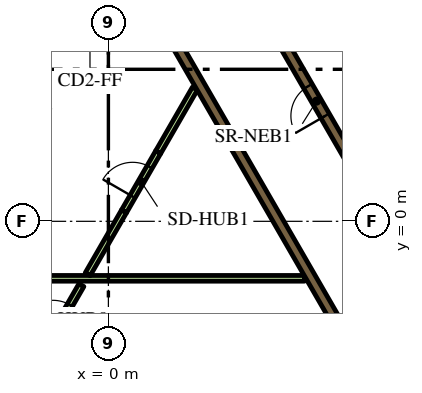
"""IFC4 building model, lengths in metres.
Left out: names, types, materials, properties, quantities, classifications, styles, units other than length and angle.
Written with IfcOpenShell. Run it as: python <this file> out.ifc"""

import sys

from ifc_helpers import new_model, si_unit, direction, frame, frame_2d, origin, place, context, subcontext, project, spatial, polyline, rectangle, outline, extrude, element, fill, save


model = new_model("IFC4")
c1 = context("Model", 3, precision=1e-05, world=origin(), true_north=direction((0.0, 1.0)))
c2 = subcontext(c1, "Body", "Model", "MODEL_VIEW")
j1 = project(units=[si_unit("LENGTHUNIT", "METRE"), si_unit("PLANEANGLEUNIT", "RADIAN")], contexts=[c1])
p1 = place(None, origin())
s1 = spatial("IfcSite", under=j1, at=p1, CompositionType="ELEMENT")
p2 = place(p1, origin())
s2 = spatial("IfcBuilding", under=s1, at=p2, CompositionType="ELEMENT")
p3 = place(p2, frame((0.0, 0.0, 27.6)))
s3 = spatial("IfcBuildingStorey", under=s2, at=p3, CompositionType="ELEMENT", Elevation=27.6)
p4 = place(p3, origin())
e1 = element("IfcWall", 1, at=p4, inside=s3, PredefinedType="SOLIDWALL", context=c2, shape_type="SweptSolid", body=[
    extrude(outline(polyline([(0.566, 6.725), (0.566, 6.875), (0.566, 6.875), (0.565, 6.875), (0.361, 6.875), (0.035, 7.439), (0.252, 7.564), (0.377, 7.348), (6.552, -3.348), (6.677, -3.564), (6.46, -3.689), (0.448, 6.725), (0.565, 6.725), (0.566, 6.725), (0.566, 6.725)])), origin(), (0.0, 0.0, 1.0), 3.9),
])
p5 = place(p3, frame((-4.2, -1.5, 0.0), z_axis=(0.0, 0.0, 1.0), x_axis=(1.0, 0.0, 0.0)))
e2 = element("IfcWall", 2, at=p5, inside=s3, PredefinedType="PARTITIONING", context=c2, shape_type="SweptSolid", body=[
    extrude(rectangle(XDim=9.359, YDim=0.15, at=frame_2d((4.68, 0.0))), origin(), (0.0, 0.0, 1.0), 2.75),
])
p6 = place(p3, frame((-0.544, -1.393, 0.0), z_axis=(0.0, 0.0, 1.0), x_axis=(0.499928740635, 0.866066541489, 0.0)))
e3 = element("IfcWall", 3, at=p6, inside=s3, PredefinedType="PARTITIONING", context=c2, shape_type="SweptSolid", body=[
    extrude(rectangle(XDim=1.912, YDim=0.15, at=frame_2d((0.956, 0.0))), origin(), (0.0, 0.0, 1.0), 2.75),
])
p7 = place(p3, frame((1.312, 1.822, 0.0), z_axis=(0.0, 0.0, 1.0), x_axis=(0.500003549559, 0.866023354436, 0.0)))
e4 = element("IfcWall", 4, at=p7, inside=s3, PredefinedType="PARTITIONING", context=c2, shape_type="SweptSolid", body=[
    extrude(rectangle(XDim=1.93, YDim=0.15, at=frame_2d((0.965, 0.0))), origin(), (0.0, 0.0, 1.0), 2.75),
])
p8 = place(p3, frame((11.553, -0.46, 0.0), z_axis=(0.0, 0.0, 1.0), x_axis=(-0.500006514828, 0.866021642414, 0.0)))
e5 = element("IfcWall", 5, at=p8, inside=s3, PredefinedType="SOLIDWALL", context=c2, shape_type="SweptSolid", body=[
    extrude(rectangle(XDim=12.35, YDim=0.25, at=frame_2d((6.175, 0.0))), origin(), (0.0, 0.0, 1.0), 3.9),
])
p9 = place(p8, frame((0.585, 0.0, 0.0)))
e6 = element("IfcOpeningElement", 6, at=p9, cuts=e5, PredefinedType="OPENING", context=c2, shape_type="SweptSolid", body=[
    extrude(rectangle(XDim=1.1, YDim=2.1, at=frame_2d((0.55, 1.05))), frame((0.0, 0.135, 0.0), z_axis=(0.0, -1.0, 0.0), x_axis=(1.0, 0.0, 0.0)), (0.0, 0.0, 1.0), 0.27),
])
p10 = place(p8, frame((3.105, 0.0, 0.0)))
e7 = element("IfcOpeningElement", 7, at=p10, cuts=e5, PredefinedType="OPENING", context=c2, shape_type="SweptSolid", body=[
    extrude(rectangle(XDim=1.1, YDim=2.1, at=frame_2d((0.55, 1.05))), frame((0.0, 0.135, 0.0), z_axis=(0.0, -1.0, 0.0), x_axis=(1.0, 0.0, 0.0)), (0.0, 0.0, 1.0), 0.27),
])
p11 = place(p8, frame((5.625, 0.0, 0.0)))
e8 = element("IfcOpeningElement", 8, at=p11, cuts=e5, PredefinedType="OPENING", context=c2, shape_type="SweptSolid", body=[
    extrude(rectangle(XDim=1.1, YDim=2.1, at=frame_2d((0.55, 1.05))), frame((0.0, 0.135, 0.0), z_axis=(0.0, -1.0, 0.0), x_axis=(1.0, 0.0, 0.0)), (0.0, 0.0, 1.0), 0.27),
])
p12 = place(p3, frame((8.565, -2.185, 0.0), z_axis=(0.0, 0.0, 1.0), x_axis=(-0.499997954832, 0.866026584559, 0.0)))
e9 = element("IfcWall", 9, at=p12, inside=s3, PredefinedType="SOLIDWALL", context=c2, shape_type="SweptSolid", body=[
    extrude(rectangle(XDim=12.35, YDim=0.25, at=frame_2d((6.175, 0.0))), origin(), (0.0, 0.0, 1.0), 3.9),
])
p13 = place(p12, frame((5.725, 0.0, 0.0)))
e10 = element("IfcOpeningElement", 10, at=p13, cuts=e9, PredefinedType="OPENING", context=c2, shape_type="SweptSolid", body=[
    extrude(rectangle(XDim=0.9, YDim=2.1, at=frame_2d((0.45, 1.05))), frame((0.0, 0.135, 0.0), z_axis=(0.0, -1.0, 0.0), x_axis=(1.0, 0.0, 0.0)), (0.0, 0.0, 1.0), 0.27),
])
p14 = place(p3, frame((-0.898, 6.194, 0.0), z_axis=(0.0, 0.0, 1.0), x_axis=(-0.499996202215, -0.866027596426, 0.0)))
e11 = element("IfcWall", 11, at=p14, inside=s3, PredefinedType="SOLIDWALL", context=c2, shape_type="SweptSolid", body=[
    extrude(rectangle(XDim=9.83, YDim=0.25, at=frame_2d((4.915, 0.0))), origin(), (0.0, 0.0, 1.0), 3.9),
])
p15 = place(p14, frame((0.585, 0.0, 0.0)))
e12 = element("IfcOpeningElement", 12, at=p15, cuts=e11, PredefinedType="OPENING", context=c2, shape_type="SweptSolid", body=[
    extrude(rectangle(XDim=1.1, YDim=2.1, at=frame_2d((0.55, 1.05))), frame((0.0, 0.135, 0.0), z_axis=(0.0, -1.0, 0.0), x_axis=(1.0, 0.0, 0.0)), (0.0, 0.0, 1.0), 0.27),
])
p16 = place(p14, frame((3.105, 0.0, 0.0)))
e13 = element("IfcOpeningElement", 13, at=p16, cuts=e11, PredefinedType="OPENING", context=c2, shape_type="SweptSolid", body=[
    extrude(rectangle(XDim=1.1, YDim=2.1, at=frame_2d((0.55, 1.05))), frame((0.0, 0.135, 0.0), z_axis=(0.0, -1.0, 0.0), x_axis=(1.0, 0.0, 0.0)), (0.0, 0.0, 1.0), 0.27),
])
p17 = place(p14, frame((5.625, 0.0, 0.0)))
e14 = element("IfcOpeningElement", 14, at=p17, cuts=e11, PredefinedType="OPENING", context=c2, shape_type="SweptSolid", body=[
    extrude(rectangle(XDim=1.1, YDim=2.1, at=frame_2d((0.55, 1.05))), frame((0.0, 0.135, 0.0), z_axis=(0.0, -1.0, 0.0), x_axis=(1.0, 0.0, 0.0)), (0.0, 0.0, 1.0), 0.27),
])
p18 = place(p14, frame((8.145, 0.0, 0.0)))
e15 = element("IfcOpeningElement", 15, at=p18, cuts=e11, PredefinedType="OPENING", context=c2, shape_type="SweptSolid", body=[
    extrude(rectangle(XDim=1.1, YDim=2.1, at=frame_2d((0.55, 1.05))), frame((0.0, 0.135, 0.0), z_axis=(0.0, -1.0, 0.0), x_axis=(1.0, 0.0, 0.0)), (0.0, 0.0, 1.0), 0.27),
])
p19 = place(p3, frame((-1.76, -3.498, 0.0), z_axis=(0.0, 0.0, 1.0), x_axis=(0.499977374825, 0.866038466041, 0.0)))
e16 = element("IfcWall", 16, at=p19, inside=s3, PredefinedType="PARTITIONING", context=c2, shape_type="SweptSolid", body=[
    extrude(rectangle(XDim=2.1, YDim=0.15, at=frame_2d((1.05, 0.0))), origin(), (0.0, 0.0, 1.0), 2.75),
])
p20 = place(p19, frame((0.6, 0.0, 0.0)))
e17 = element("IfcOpeningElement", 17, at=p20, cuts=e16, PredefinedType="OPENING", context=c2, shape_type="SweptSolid", body=[
    extrude(rectangle(XDim=0.9, YDim=2.1, at=frame_2d((0.45, 1.05))), frame((0.0, 0.085, 0.0), z_axis=(0.0, -1.0, 0.0), x_axis=(1.0, 0.0, 0.0)), (0.0, 0.0, 1.0), 0.17),
])
p21 = place(p3, frame((0.412, 0.263, 0.0), z_axis=(0.0, 0.0, 1.0), x_axis=(0.500062916607, 0.865989075817, 0.0)))
e18 = element("IfcWall", 18, at=p21, inside=s3, PredefinedType="PARTITIONING", context=c2, shape_type="SweptSolid", body=[
    extrude(rectangle(XDim=1.8, YDim=0.15, at=frame_2d((0.9, 0.0))), origin(), (0.0, 0.0, 1.0), 2.75),
])
p22 = place(p21, frame((0.45, 0.0, 0.0)))
e19 = element("IfcOpeningElement", 19, at=p22, cuts=e18, PredefinedType="OPENING", context=c2, shape_type="SweptSolid", body=[
    extrude(rectangle(XDim=0.9, YDim=2.1, at=frame_2d((0.45, 1.05))), frame((0.0, 0.085, 0.0), z_axis=(0.0, -1.0, 0.0), x_axis=(1.0, 0.0, 0.0)), (0.0, 0.0, 1.0), 0.17),
])
p23 = place(p3, frame((6.163, 18.475, 0.0), z_axis=(0.0, 0.0, 1.0), x_axis=(0.500001317485, -0.866024643133, 0.0)))
e20 = element("IfcWall", 20, at=p23, inside=s3, PredefinedType="PARTITIONING", context=c2, shape_type="SweptSolid", body=[
    extrude(rectangle(XDim=25.767, YDim=0.15, at=frame_2d((12.883, 0.0))), origin(), (0.0, 0.0, 1.0), 2.75),
])
p24 = place(p23, frame((24.586, 0.0, 0.0)))
e21 = element("IfcOpeningElement", 21, at=p24, cuts=e20, PredefinedType="OPENING", context=c2, shape_type="SweptSolid", body=[
    extrude(rectangle(XDim=1.0, YDim=2.1, at=frame_2d((0.5, 1.05))), frame((0.0, 0.085, 0.0), z_axis=(0.0, -1.0, 0.0), x_axis=(1.0, 0.0, 0.0)), (0.0, 0.0, 1.0), 0.17),
])
p25 = place(p23, frame((19.319, 0.0, 0.0)))
e22 = element("IfcOpeningElement", 22, at=p25, cuts=e20, PredefinedType="OPENING", context=c2, shape_type="SweptSolid", body=[
    extrude(rectangle(XDim=1.0, YDim=2.1, at=frame_2d((0.5, 1.05))), frame((0.0, 0.085, 0.0), z_axis=(0.0, -1.0, 0.0), x_axis=(1.0, 0.0, 0.0)), (0.0, 0.0, 1.0), 0.17),
])
p26 = place(p23, frame((18.012, 0.0, 0.0)))
e23 = element("IfcOpeningElement", 23, at=p26, cuts=e20, PredefinedType="OPENING", context=c2, shape_type="SweptSolid", body=[
    extrude(rectangle(XDim=1.0, YDim=2.1, at=frame_2d((0.5, 1.05))), frame((0.0, 0.085, 0.0), z_axis=(0.0, -1.0, 0.0), x_axis=(1.0, 0.0, 0.0)), (0.0, 0.0, 1.0), 0.17),
])
p27 = place(p23, frame((6.824, 0.0, 0.0)))
e24 = element("IfcOpeningElement", 24, at=p27, cuts=e20, PredefinedType="OPENING", context=c2, shape_type="SweptSolid", body=[
    extrude(rectangle(XDim=1.1, YDim=2.1, at=frame_2d((0.55, 1.05))), frame((0.0, 0.085, 0.0), z_axis=(0.0, -1.0, 0.0), x_axis=(1.0, 0.0, 0.0)), (0.0, 0.0, 1.0), 0.17),
])
p28 = place(p23, frame((4.658, 0.0, 0.0)))
e25 = element("IfcOpeningElement", 25, at=p28, cuts=e20, PredefinedType="OPENING", context=c2, shape_type="SweptSolid", body=[
    extrude(rectangle(XDim=0.9, YDim=2.1, at=frame_2d((0.45, 1.05))), frame((0.0, 0.085, 0.0), z_axis=(0.0, -1.0, 0.0), x_axis=(1.0, 0.0, 0.0)), (0.0, 0.0, 1.0), 0.17),
])
p29 = place(p23, frame((0.18, 0.0, 0.0)))
e26 = element("IfcOpeningElement", 26, at=p29, cuts=e20, PredefinedType="OPENING", context=c2, shape_type="SweptSolid", body=[
    extrude(rectangle(XDim=1.0, YDim=2.1, at=frame_2d((0.5, 1.05))), frame((0.0, 0.085, 0.0), z_axis=(0.0, -1.0, 0.0), x_axis=(1.0, 0.0, 0.0)), (0.0, 0.0, 1.0), 0.17),
])
p30 = place(p13, origin())
e27 = element("IfcDoor", 27, at=p30, inside=s3, OperationType="SINGLE_SWING_LEFT", PredefinedType="DOOR", context=c2, shape_type="SweptSolid", body=[
    extrude(rectangle(XDim=0.9, YDim=2.1, at=frame_2d((0.45, 1.05))), frame((0.0, 0.025, 0.0), z_axis=(0.0, -1.0, 0.0), x_axis=(1.0, 0.0, 0.0)), (0.0, 0.0, 1.0), 0.05),
])
fill(e10, e27)
p31 = place(p20, origin())
e28 = element("IfcDoor", 28, at=p31, inside=s3, OperationType="SINGLE_SWING_LEFT", PredefinedType="DOOR", context=c2, shape_type="SweptSolid", body=[
    extrude(rectangle(XDim=0.9, YDim=2.1, at=frame_2d((0.45, 1.05))), frame((0.0, 0.025, 0.0), z_axis=(0.0, -1.0, 0.0), x_axis=(1.0, 0.0, 0.0)), (0.0, 0.0, 1.0), 0.05),
])
fill(e17, e28)
p32 = place(p22, origin())
e29 = element("IfcDoor", 29, at=p32, inside=s3, OperationType="SINGLE_SWING_LEFT", PredefinedType="DOOR", context=c2, shape_type="SweptSolid", body=[
    extrude(rectangle(XDim=0.9, YDim=2.1, at=frame_2d((0.45, 1.05))), frame((0.0, 0.025, 0.0), z_axis=(0.0, -1.0, 0.0), x_axis=(1.0, 0.0, 0.0)), (0.0, 0.0, 1.0), 0.05),
])
fill(e19, e29)
save(model, sys.argv[1])
